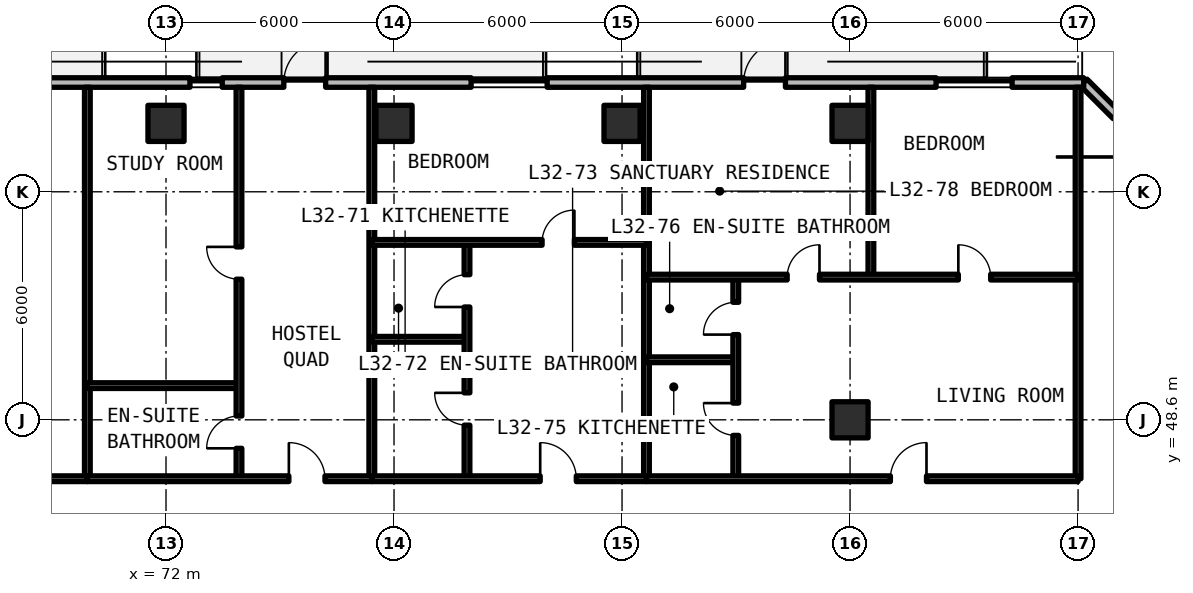
"""IFC4 building model, lengths in metres.
Left out: names, types, materials, properties, quantities, classifications, styles, units other than length and angle.
Written with IfcOpenShell. Run it as: python <this file> out.ifc"""

import sys

from ifc_helpers import new_model, si_unit, direction, frame, frame_2d, origin, origin_2d, place, context, subcontext, project, spatial, rectangle, extrude, element, fill, save


model = new_model("IFC4")
c1 = context("Model", 3, precision=1e-05, world=origin(), true_north=direction((0.0, 1.0)))
c2 = subcontext(c1, "Body", "Model", "MODEL_VIEW")
j1 = project(units=[si_unit("LENGTHUNIT", "METRE"), si_unit("PLANEANGLEUNIT", "RADIAN")], contexts=[c1])
p1 = place(None, origin())
s1 = spatial("IfcSite", under=j1, at=p1, CompositionType="ELEMENT")
p2 = place(p1, origin())
s2 = spatial("IfcBuilding", under=s1, at=p2, CompositionType="ELEMENT")
p3 = place(p2, frame((0.0, 0.0, 115.83)))
s3 = spatial("IfcBuildingStorey", under=s2, at=p3, CompositionType="ELEMENT", Elevation=115.83)
for number, where, z_axis, x_axis in (
    (1, (90.0, 48.6, 0.0), (0.0, 0.0, 1.0), (1.0, 0.0, 0.0)),
    (2, (72.0, 56.4, 0.0), (0.0, 0.0, 1.0), (1.0, 0.0, 0.0)),
    (3, (78.0, 56.4, 0.0), (0.0, 0.0, 1.0), (1.0, 0.0, 0.0)),
    (4, (84.0, 56.4, 0.0), (0.0, 0.0, 1.0), (1.0, 0.0, 0.0)),
    (5, (90.0, 56.4, 0.0), (0.0, 0.0, 1.0), (1.0, 0.0, 0.0)),
):
    element("IfcColumn", number, at=place(p3, frame(where, z_axis=z_axis, x_axis=x_axis)), inside=s3, PredefinedType="COLUMN", context=c2, shape_type="SweptSolid", body=[
        extrude(rectangle(XDim=0.95, YDim=0.95, at=origin_2d()), origin(), (0.0, 0.0, 1.0), 3.63),
    ])
p4 = place(p3, frame((100.275, 53.348, 0.0), z_axis=(0.0, 0.0, 1.0), x_axis=(-0.70708586489, 0.707127696864, 0.0)))
e6 = element("IfcWall", 6, at=p4, inside=s3, PredefinedType="SOLIDWALL", context=c2, shape_type="SweptSolid", body=[
    extrude(rectangle(XDim=5.836, YDim=0.25, at=frame_2d((2.918, 0.0))), origin(), (0.0, 0.0, 1.0), 3.41),
])
p5 = place(p4, frame((1.218, 0.0, 0.78)))
e7 = element("IfcOpeningElement", 7, at=p5, cuts=e6, PredefinedType="OPENING", context=c2, shape_type="SweptSolid", body=[
    extrude(rectangle(XDim=3.4, YDim=1.66, at=frame_2d((1.7, 0.83))), frame((0.0, 0.135, 0.0), z_axis=(0.0, -1.0, 0.0), x_axis=(1.0, 0.0, 0.0)), (0.0, 0.0, 1.0), 0.27),
])
p6 = place(p3, frame((96.148, 57.475, 0.0), z_axis=(0.0, 0.0, 1.0), x_axis=(-1.0, 0.0, 0.0)))
e8 = element("IfcWall", 8, at=p6, inside=s3, PredefinedType="SOLIDWALL", context=c2, shape_type="SweptSolid", body=[
    extrude(rectangle(XDim=44.023, YDim=0.25, at=frame_2d((22.012, 0.0))), origin(), (0.0, 0.0, 1.0), 3.41),
])
p7 = place(p6, frame((32.048, 0.0, 0.0)))
e9 = element("IfcOpeningElement", 9, at=p7, cuts=e8, PredefinedType="OPENING", context=c2, shape_type="SweptSolid", body=[
    extrude(rectangle(XDim=1.1, YDim=2.15, at=frame_2d((0.55, 1.075))), frame((0.0, 0.135, 0.0), z_axis=(0.0, -1.0, 0.0), x_axis=(1.0, 0.0, 0.0)), (0.0, 0.0, 1.0), 0.27),
])
p8 = place(p6, frame((19.948, 0.0, 0.0)))
e10 = element("IfcOpeningElement", 10, at=p8, cuts=e8, PredefinedType="OPENING", context=c2, shape_type="SweptSolid", body=[
    extrude(rectangle(XDim=1.1, YDim=2.15, at=frame_2d((0.55, 1.075))), frame((0.0, 0.135, 0.0), z_axis=(0.0, -1.0, 0.0), x_axis=(1.0, 0.0, 0.0)), (0.0, 0.0, 1.0), 0.27),
])
p9 = place(p6, frame((7.848, 0.0, 0.0)))
e11 = element("IfcOpeningElement", 11, at=p9, cuts=e8, PredefinedType="OPENING", context=c2, shape_type="SweptSolid", body=[
    extrude(rectangle(XDim=1.1, YDim=2.15, at=frame_2d((0.55, 1.075))), frame((0.0, 0.135, 0.0), z_axis=(0.0, -1.0, 0.0), x_axis=(1.0, 0.0, 0.0)), (0.0, 0.0, 1.0), 0.27),
])
p10 = place(p6, frame((38.769, 0.0, 0.78)))
e12 = element("IfcOpeningElement", 12, at=p10, cuts=e8, PredefinedType="OPENING", context=c2, shape_type="SweptSolid", body=[
    extrude(rectangle(XDim=2.0, YDim=1.66, at=frame_2d((1.0, 0.83))), frame((0.0, 0.135, 0.0), z_axis=(0.0, -1.0, 0.0), x_axis=(1.0, 0.0, 0.0)), (0.0, 0.0, 1.0), 0.27),
])
p11 = place(p6, frame((22.668, 0.0, 0.78)))
e13 = element("IfcOpeningElement", 13, at=p11, cuts=e8, PredefinedType="OPENING", context=c2, shape_type="SweptSolid", body=[
    extrude(rectangle(XDim=0.85, YDim=1.65, at=frame_2d((0.425, 0.825))), frame((0.0, 0.135, 0.0), z_axis=(0.0, -1.0, 0.0), x_axis=(1.0, 0.0, 0.0)), (0.0, 0.0, 1.0), 0.27),
])
p12 = place(p6, frame((14.119, 0.0, 0.78)))
e14 = element("IfcOpeningElement", 14, at=p12, cuts=e8, PredefinedType="OPENING", context=c2, shape_type="SweptSolid", body=[
    extrude(rectangle(XDim=2.0, YDim=1.66, at=frame_2d((1.0, 0.83))), frame((0.0, 0.135, 0.0), z_axis=(0.0, -1.0, 0.0), x_axis=(1.0, 0.0, 0.0)), (0.0, 0.0, 1.0), 0.27),
])
p13 = place(p6, frame((1.884, 0.0, 0.78)))
e15 = element("IfcOpeningElement", 15, at=p13, cuts=e8, PredefinedType="OPENING", context=c2, shape_type="SweptSolid", body=[
    extrude(rectangle(XDim=2.0, YDim=1.66, at=frame_2d((1.0, 0.83))), frame((0.0, 0.135, 0.0), z_axis=(0.0, -1.0, 0.0), x_axis=(1.0, 0.0, 0.0)), (0.0, 0.0, 1.0), 0.27),
])
for number, where, z_axis, x_axis in (
    (16, (96.0, 47.05, 0.0), (0.0, 0.0, 1.0), (0.0, 1.0, 0.0)),
    (17, (69.93, 47.05, 0.0), (0.0, 0.0, 1.0), (0.0, 1.0, 0.0)),
):
    element("IfcWall", number, at=place(p3, frame(where, z_axis=z_axis, x_axis=x_axis)), inside=s3, PredefinedType="SOLIDWALL", context=c2, shape_type="SweptSolid", body=[
        extrude(rectangle(XDim=10.3, YDim=0.15, at=frame_2d((5.15, 0.0))), origin(), (0.0, 0.0, 1.0), 2.63),
    ])
p14 = place(p3, frame((60.638, 47.05, 0.0), z_axis=(0.0, 0.0, 1.0), x_axis=(1.0, 0.0, 0.0)))
e18 = element("IfcWall", 18, at=p14, inside=s3, PredefinedType="SOLIDWALL", context=c2, shape_type="SweptSolid", body=[
    extrude(rectangle(XDim=9.292, YDim=0.15, at=frame_2d((4.646, 0.0))), origin(), (0.0, 0.0, 1.0), 2.63),
])
p15 = place(p14, frame((4.096, 0.0, 0.0)))
e19 = element("IfcOpeningElement", 19, at=p15, cuts=e18, PredefinedType="OPENING", context=c2, shape_type="SweptSolid", body=[
    extrude(rectangle(XDim=1.1, YDim=2.15, at=frame_2d((0.55, 1.075))), frame((0.0, 0.085, 0.0), z_axis=(0.0, -1.0, 0.0), x_axis=(1.0, 0.0, 0.0)), (0.0, 0.0, 1.0), 0.17),
])
p16 = place(p3, frame((77.416, 47.05, 0.0), z_axis=(0.0, 0.0, 1.0), x_axis=(0.0, 1.0, 0.0)))
e20 = element("IfcWall", 20, at=p16, inside=s3, PredefinedType="SOLIDWALL", context=c2, shape_type="SweptSolid", body=[
    extrude(rectangle(XDim=10.3, YDim=0.15, at=frame_2d((5.15, 0.0))), origin(), (0.0, 0.0, 1.0), 2.63),
])
p17 = place(p3, frame((69.93, 49.5, 0.0), z_axis=(0.0, 0.0, 1.0), x_axis=(1.0, 0.0, 0.0)))
e21 = element("IfcWall", 21, at=p17, inside=s3, PredefinedType="PARTITIONING", context=c2, shape_type="SweptSolid", body=[
    extrude(rectangle(XDim=3.99, YDim=0.15, at=frame_2d((1.995, 0.0))), origin(), (0.0, 0.0, 1.0), 2.63),
])
p18 = place(p3, frame((73.92, 47.05, 0.0), z_axis=(0.0, 0.0, 1.0), x_axis=(0.0, 1.0, 0.0)))
e22 = element("IfcWall", 22, at=p18, inside=s3, PredefinedType="PARTITIONING", context=c2, shape_type="SweptSolid", body=[
    extrude(rectangle(XDim=10.3, YDim=0.15, at=frame_2d((5.15, 0.0))), origin(), (0.0, 0.0, 1.0), 2.63),
])
p19 = place(p18, frame((0.8, 0.0, 0.0)))
e23 = element("IfcOpeningElement", 23, at=p19, cuts=e22, PredefinedType="OPENING", context=c2, shape_type="SweptSolid", body=[
    extrude(rectangle(XDim=0.85, YDim=2.1, at=frame_2d((0.425, 1.05))), frame((0.0, 0.085, 0.0), z_axis=(0.0, -1.0, 0.0), x_axis=(1.0, 0.0, 0.0)), (0.0, 0.0, 1.0), 0.17),
])
p20 = place(p18, frame((5.25, 0.0, 0.0)))
e24 = element("IfcOpeningElement", 24, at=p20, cuts=e22, PredefinedType="OPENING", context=c2, shape_type="SweptSolid", body=[
    extrude(rectangle(XDim=0.85, YDim=2.1, at=frame_2d((0.425, 1.05))), frame((0.0, 0.085, 0.0), z_axis=(0.0, -1.0, 0.0), x_axis=(1.0, 0.0, 0.0)), (0.0, 0.0, 1.0), 0.17),
])
p21 = place(p3, frame((69.93, 47.05, 0.0), z_axis=(0.0, 0.0, 1.0), x_axis=(1.0, 0.0, 0.0)))
e25 = element("IfcWall", 25, at=p21, inside=s3, PredefinedType="SOLIDWALL", context=c2, shape_type="SweptSolid", body=[
    extrude(rectangle(XDim=7.485, YDim=0.15, at=frame_2d((3.743, 0.0))), origin(), (0.0, 0.0, 1.0), 2.63),
])
p22 = place(p21, frame((5.302, 0.0, 0.0)))
e26 = element("IfcOpeningElement", 26, at=p22, cuts=e25, PredefinedType="OPENING", context=c2, shape_type="SweptSolid", body=[
    extrude(rectangle(XDim=0.95, YDim=2.15, at=frame_2d((0.475, 1.075))), frame((0.0, 0.085, 0.0), z_axis=(0.0, -1.0, 0.0), x_axis=(1.0, 0.0, 0.0)), (0.0, 0.0, 1.0), 0.17),
])
p23 = place(p3, frame((84.643, 47.05, 0.0), z_axis=(0.0, 0.0, 1.0), x_axis=(0.0, 1.0, 0.0)))
e27 = element("IfcWall", 27, at=p23, inside=s3, PredefinedType="SOLIDWALL", context=c2, shape_type="SweptSolid", body=[
    extrude(rectangle(XDim=10.3, YDim=0.15, at=frame_2d((5.15, 0.0))), origin(), (0.0, 0.0, 1.0), 2.63),
])
p24 = place(p3, frame((77.416, 50.719, 0.0), z_axis=(0.0, 0.0, 1.0), x_axis=(1.0, 0.0, 0.0)))
e28 = element("IfcWall", 28, at=p24, inside=s3, PredefinedType="PARTITIONING", context=c2, shape_type="SweptSolid", body=[
    extrude(rectangle(XDim=2.504, YDim=0.15, at=frame_2d((1.252, 0.0))), origin(), (0.0, 0.0, 1.0), 2.63),
])
p25 = place(p3, frame((79.92, 47.05, 0.0), z_axis=(0.0, 0.0, 1.0), x_axis=(0.0, 1.0, 0.0)))
e29 = element("IfcWall", 29, at=p25, inside=s3, PredefinedType="PARTITIONING", context=c2, shape_type="SweptSolid", body=[
    extrude(rectangle(XDim=6.218, YDim=0.15, at=frame_2d((3.109, 0.0))), origin(), (0.0, 0.0, 1.0), 2.63),
])
p26 = place(p25, frame((1.409, 0.0, 0.0)))
e30 = element("IfcOpeningElement", 30, at=p26, cuts=e29, PredefinedType="OPENING", context=c2, shape_type="SweptSolid", body=[
    extrude(rectangle(XDim=0.85, YDim=2.1, at=frame_2d((0.425, 1.05))), frame((0.0, 0.085, 0.0), z_axis=(0.0, -1.0, 0.0), x_axis=(1.0, 0.0, 0.0)), (0.0, 0.0, 1.0), 0.17),
])
p27 = place(p25, frame((4.519, 0.0, 0.0)))
e31 = element("IfcOpeningElement", 31, at=p27, cuts=e29, PredefinedType="OPENING", context=c2, shape_type="SweptSolid", body=[
    extrude(rectangle(XDim=0.85, YDim=2.1, at=frame_2d((0.425, 1.05))), frame((0.0, 0.085, 0.0), z_axis=(0.0, -1.0, 0.0), x_axis=(1.0, 0.0, 0.0)), (0.0, 0.0, 1.0), 0.17),
])
p28 = place(p3, frame((77.416, 53.268, 0.0), z_axis=(0.0, 0.0, 1.0), x_axis=(1.0, 0.0, 0.0)))
e32 = element("IfcWall", 32, at=p28, inside=s3, PredefinedType="PARTITIONING", context=c2, shape_type="SweptSolid", body=[
    extrude(rectangle(XDim=7.227, YDim=0.15, at=frame_2d((3.614, 0.0))), origin(), (0.0, 0.0, 1.0), 2.63),
])
p29 = place(p28, frame((4.481, 0.0, 0.0)))
e33 = element("IfcOpeningElement", 33, at=p29, cuts=e32, PredefinedType="OPENING", context=c2, shape_type="SweptSolid", body=[
    extrude(rectangle(XDim=0.85, YDim=2.1, at=frame_2d((0.425, 1.05))), frame((0.0, 0.085, 0.0), z_axis=(0.0, -1.0, 0.0), x_axis=(1.0, 0.0, 0.0)), (0.0, 0.0, 1.0), 0.17),
])
p30 = place(p3, frame((77.416, 47.05, 0.0), z_axis=(0.0, 0.0, 1.0), x_axis=(1.0, 0.0, 0.0)))
e34 = element("IfcWall", 34, at=p30, inside=s3, PredefinedType="SOLIDWALL", context=c2, shape_type="SweptSolid", body=[
    extrude(rectangle(XDim=7.227, YDim=0.15, at=frame_2d((3.614, 0.0))), origin(), (0.0, 0.0, 1.0), 2.63),
])
p31 = place(p30, frame((4.431, 0.0, 0.0)))
e35 = element("IfcOpeningElement", 35, at=p31, cuts=e34, PredefinedType="OPENING", context=c2, shape_type="SweptSolid", body=[
    extrude(rectangle(XDim=0.95, YDim=2.15, at=frame_2d((0.475, 1.075))), frame((0.0, 0.085, 0.0), z_axis=(0.0, -1.0, 0.0), x_axis=(1.0, 0.0, 0.0)), (0.0, 0.0, 1.0), 0.17),
])
p32 = place(p3, frame((84.643, 50.18, 0.0), z_axis=(0.0, 0.0, 1.0), x_axis=(1.0, 0.0, 0.0)))
e36 = element("IfcWall", 36, at=p32, inside=s3, PredefinedType="PARTITIONING", context=c2, shape_type="SweptSolid", body=[
    extrude(rectangle(XDim=2.35, YDim=0.15, at=frame_2d((1.175, 0.0))), origin(), (0.0, 0.0, 1.0), 2.63),
])
p33 = place(p3, frame((86.993, 47.05, 0.0), z_axis=(0.0, 0.0, 1.0), x_axis=(0.0, 1.0, 0.0)))
e37 = element("IfcWall", 37, at=p33, inside=s3, PredefinedType="PARTITIONING", context=c2, shape_type="SweptSolid", body=[
    extrude(rectangle(XDim=5.305, YDim=0.15, at=frame_2d((2.652, 0.0))), origin(), (0.0, 0.0, 1.0), 2.63),
])
p34 = place(p33, frame((1.14, 0.0, 0.0)))
e38 = element("IfcOpeningElement", 38, at=p34, cuts=e37, PredefinedType="OPENING", context=c2, shape_type="SweptSolid", body=[
    extrude(rectangle(XDim=0.85, YDim=2.1, at=frame_2d((0.425, 1.05))), frame((0.0, 0.085, 0.0), z_axis=(0.0, -1.0, 0.0), x_axis=(1.0, 0.0, 0.0)), (0.0, 0.0, 1.0), 0.17),
])
p35 = place(p33, frame((3.792, 0.0, 0.0)))
e39 = element("IfcOpeningElement", 39, at=p35, cuts=e37, PredefinedType="OPENING", context=c2, shape_type="SweptSolid", body=[
    extrude(rectangle(XDim=0.85, YDim=2.1, at=frame_2d((0.425, 1.05))), frame((0.0, 0.085, 0.0), z_axis=(0.0, -1.0, 0.0), x_axis=(1.0, 0.0, 0.0)), (0.0, 0.0, 1.0), 0.17),
])
p36 = place(p3, frame((90.549, 52.355, 0.0), z_axis=(0.0, 0.0, 1.0), x_axis=(0.0, 1.0, 0.0)))
e40 = element("IfcWall", 40, at=p36, inside=s3, PredefinedType="PARTITIONING", context=c2, shape_type="SweptSolid", body=[
    extrude(rectangle(XDim=4.995, YDim=0.15, at=frame_2d((2.498, 0.0))), origin(), (0.0, 0.0, 1.0), 2.63),
])
p37 = place(p3, frame((84.643, 52.355, 0.0), z_axis=(0.0, 0.0, 1.0), x_axis=(1.0, 0.0, 0.0)))
e41 = element("IfcWall", 41, at=p37, inside=s3, PredefinedType="PARTITIONING", context=c2, shape_type="SweptSolid", body=[
    extrude(rectangle(XDim=11.357, YDim=0.15, at=frame_2d((5.679, 0.0))), origin(), (0.0, 0.0, 1.0), 2.63),
])
p38 = place(p37, frame((3.703, 0.0, 0.0)))
e42 = element("IfcOpeningElement", 42, at=p38, cuts=e41, PredefinedType="OPENING", context=c2, shape_type="SweptSolid", body=[
    extrude(rectangle(XDim=0.85, YDim=2.1, at=frame_2d((0.425, 1.05))), frame((0.0, 0.085, 0.0), z_axis=(0.0, -1.0, 0.0), x_axis=(1.0, 0.0, 0.0)), (0.0, 0.0, 1.0), 0.17),
])
p39 = place(p37, frame((8.207, 0.0, 0.0)))
e43 = element("IfcOpeningElement", 43, at=p39, cuts=e41, PredefinedType="OPENING", context=c2, shape_type="SweptSolid", body=[
    extrude(rectangle(XDim=0.85, YDim=2.1, at=frame_2d((0.425, 1.05))), frame((0.0, 0.085, 0.0), z_axis=(0.0, -1.0, 0.0), x_axis=(1.0, 0.0, 0.0)), (0.0, 0.0, 1.0), 0.17),
])
p40 = place(p3, frame((84.643, 47.05, 0.0), z_axis=(0.0, 0.0, 1.0), x_axis=(1.0, 0.0, 0.0)))
e44 = element("IfcWall", 44, at=p40, inside=s3, PredefinedType="SOLIDWALL", context=c2, shape_type="SweptSolid", body=[
    extrude(rectangle(XDim=11.357, YDim=0.15, at=frame_2d((5.679, 0.0))), origin(), (0.0, 0.0, 1.0), 2.63),
])
p41 = place(p40, frame((6.419, 0.0, 0.0)))
e45 = element("IfcOpeningElement", 45, at=p41, cuts=e44, PredefinedType="OPENING", context=c2, shape_type="SweptSolid", body=[
    extrude(rectangle(XDim=0.95, YDim=2.15, at=frame_2d((0.475, 1.075))), frame((0.0, 0.085, 0.0), z_axis=(0.0, -1.0, 0.0), x_axis=(1.0, 0.0, 0.0)), (0.0, 0.0, 1.0), 0.17),
])
p42 = place(p8, frame((1.1, 0.0, 0.0), z_axis=(0.0, 0.0, 1.0), x_axis=(-1.0, 0.0, 0.0)))
e46 = element("IfcDoor", 46, at=p42, inside=s3, OperationType="SINGLE_SWING_RIGHT", PredefinedType="DOOR", context=c2, shape_type="SweptSolid", body=[
    extrude(rectangle(XDim=1.1, YDim=2.15, at=frame_2d((0.55, 1.075))), frame((0.0, 0.025, 0.0), z_axis=(0.0, -1.0, 0.0), x_axis=(1.0, 0.0, 0.0)), (0.0, 0.0, 1.0), 0.05),
])
fill(e10, e46)
p43 = place(p9, frame((1.1, 0.0, 0.0), z_axis=(0.0, 0.0, 1.0), x_axis=(-1.0, 0.0, 0.0)))
e47 = element("IfcDoor", 47, at=p43, inside=s3, OperationType="SINGLE_SWING_LEFT", PredefinedType="DOOR", context=c2, shape_type="SweptSolid", body=[
    extrude(rectangle(XDim=1.1, YDim=2.15, at=frame_2d((0.55, 1.075))), frame((0.0, 0.025, 0.0), z_axis=(0.0, -1.0, 0.0), x_axis=(1.0, 0.0, 0.0)), (0.0, 0.0, 1.0), 0.05),
])
fill(e11, e47)
p44 = place(p11, origin())
e48 = element("IfcWindow", 48, at=p44, inside=s3, PartitioningType="SINGLE_PANEL", PredefinedType="WINDOW", context=c2, shape_type="SweptSolid", body=[
    extrude(rectangle(XDim=0.85, YDim=1.65, at=frame_2d((0.425, 0.825))), frame((0.0, 0.03, 0.0), z_axis=(0.0, -1.0, 0.0), x_axis=(1.0, 0.0, 0.0)), (0.0, 0.0, 1.0), 0.06),
])
fill(e13, e48)
p45 = place(p12, origin())
e49 = element("IfcWindow", 49, at=p45, inside=s3, PartitioningType="SINGLE_PANEL", PredefinedType="WINDOW", context=c2, shape_type="SweptSolid", body=[
    extrude(rectangle(XDim=2.0, YDim=1.66, at=frame_2d((1.0, 0.83))), frame((0.0, 0.03, 0.0), z_axis=(0.0, -1.0, 0.0), x_axis=(1.0, 0.0, 0.0)), (0.0, 0.0, 1.0), 0.06),
])
fill(e14, e49)
p46 = place(p13, origin())
e50 = element("IfcWindow", 50, at=p46, inside=s3, PartitioningType="SINGLE_PANEL", PredefinedType="WINDOW", context=c2, shape_type="SweptSolid", body=[
    extrude(rectangle(XDim=2.0, YDim=1.66, at=frame_2d((1.0, 0.83))), frame((0.0, 0.03, 0.0), z_axis=(0.0, -1.0, 0.0), x_axis=(1.0, 0.0, 0.0)), (0.0, 0.0, 1.0), 0.06),
])
fill(e15, e50)
p47 = place(p19, origin())
e51 = element("IfcDoor", 51, at=p47, inside=s3, OperationType="SINGLE_SWING_LEFT", PredefinedType="DOOR", context=c2, shape_type="SweptSolid", body=[
    extrude(rectangle(XDim=0.85, YDim=2.1, at=frame_2d((0.425, 1.05))), frame((0.0, 0.025, 0.0), z_axis=(0.0, -1.0, 0.0), x_axis=(1.0, 0.0, 0.0)), (0.0, 0.0, 1.0), 0.05),
])
fill(e23, e51)
p48 = place(p20, origin())
e52 = element("IfcDoor", 52, at=p48, inside=s3, OperationType="SINGLE_SWING_RIGHT", PredefinedType="DOOR", context=c2, shape_type="SweptSolid", body=[
    extrude(rectangle(XDim=0.85, YDim=2.1, at=frame_2d((0.425, 1.05))), frame((0.0, 0.025, 0.0), z_axis=(0.0, -1.0, 0.0), x_axis=(1.0, 0.0, 0.0)), (0.0, 0.0, 1.0), 0.05),
])
fill(e24, e52)
p49 = place(p22, origin())
e53 = element("IfcDoor", 53, at=p49, inside=s3, OperationType="SINGLE_SWING_LEFT", PredefinedType="DOOR", context=c2, shape_type="SweptSolid", body=[
    extrude(rectangle(XDim=0.95, YDim=2.15, at=frame_2d((0.475, 1.075))), frame((0.0, 0.025, 0.0), z_axis=(0.0, -1.0, 0.0), x_axis=(1.0, 0.0, 0.0)), (0.0, 0.0, 1.0), 0.05),
])
fill(e26, e53)
p50 = place(p26, origin())
e54 = element("IfcDoor", 54, at=p50, inside=s3, OperationType="SINGLE_SWING_RIGHT", PredefinedType="DOOR", context=c2, shape_type="SweptSolid", body=[
    extrude(rectangle(XDim=0.85, YDim=2.1, at=frame_2d((0.425, 1.05))), frame((0.0, 0.025, 0.0), z_axis=(0.0, -1.0, 0.0), x_axis=(1.0, 0.0, 0.0)), (0.0, 0.0, 1.0), 0.05),
])
fill(e30, e54)
p51 = place(p27, origin())
e55 = element("IfcDoor", 55, at=p51, inside=s3, OperationType="SINGLE_SWING_LEFT", PredefinedType="DOOR", context=c2, shape_type="SweptSolid", body=[
    extrude(rectangle(XDim=0.85, YDim=2.1, at=frame_2d((0.425, 1.05))), frame((0.0, 0.025, 0.0), z_axis=(0.0, -1.0, 0.0), x_axis=(1.0, 0.0, 0.0)), (0.0, 0.0, 1.0), 0.05),
])
fill(e31, e55)
p52 = place(p29, origin())
e56 = element("IfcDoor", 56, at=p52, inside=s3, OperationType="SINGLE_SWING_RIGHT", PredefinedType="DOOR", context=c2, shape_type="SweptSolid", body=[
    extrude(rectangle(XDim=0.85, YDim=2.1, at=frame_2d((0.425, 1.05))), frame((0.0, 0.025, 0.0), z_axis=(0.0, -1.0, 0.0), x_axis=(1.0, 0.0, 0.0)), (0.0, 0.0, 1.0), 0.05),
])
fill(e33, e56)
p53 = place(p31, origin())
e57 = element("IfcDoor", 57, at=p53, inside=s3, OperationType="SINGLE_SWING_LEFT", PredefinedType="DOOR", context=c2, shape_type="SweptSolid", body=[
    extrude(rectangle(XDim=0.95, YDim=2.15, at=frame_2d((0.475, 1.075))), frame((0.0, 0.025, 0.0), z_axis=(0.0, -1.0, 0.0), x_axis=(1.0, 0.0, 0.0)), (0.0, 0.0, 1.0), 0.05),
])
fill(e35, e57)
p54 = place(p34, origin())
e58 = element("IfcDoor", 58, at=p54, inside=s3, OperationType="SINGLE_SWING_RIGHT", PredefinedType="DOOR", context=c2, shape_type="SweptSolid", body=[
    extrude(rectangle(XDim=0.85, YDim=2.1, at=frame_2d((0.425, 1.05))), frame((0.0, 0.025, 0.0), z_axis=(0.0, -1.0, 0.0), x_axis=(1.0, 0.0, 0.0)), (0.0, 0.0, 1.0), 0.05),
])
fill(e38, e58)
p55 = place(p35, origin())
e59 = element("IfcDoor", 59, at=p55, inside=s3, OperationType="SINGLE_SWING_LEFT", PredefinedType="DOOR", context=c2, shape_type="SweptSolid", body=[
    extrude(rectangle(XDim=0.85, YDim=2.1, at=frame_2d((0.425, 1.05))), frame((0.0, 0.025, 0.0), z_axis=(0.0, -1.0, 0.0), x_axis=(1.0, 0.0, 0.0)), (0.0, 0.0, 1.0), 0.05),
])
fill(e39, e59)
p56 = place(p38, origin())
e60 = element("IfcDoor", 60, at=p56, inside=s3, OperationType="SINGLE_SWING_RIGHT", PredefinedType="DOOR", context=c2, shape_type="SweptSolid", body=[
    extrude(rectangle(XDim=0.85, YDim=2.1, at=frame_2d((0.425, 1.05))), frame((0.0, 0.025, 0.0), z_axis=(0.0, -1.0, 0.0), x_axis=(1.0, 0.0, 0.0)), (0.0, 0.0, 1.0), 0.05),
])
fill(e42, e60)
p57 = place(p39, origin())
e61 = element("IfcDoor", 61, at=p57, inside=s3, OperationType="SINGLE_SWING_LEFT", PredefinedType="DOOR", context=c2, shape_type="SweptSolid", body=[
    extrude(rectangle(XDim=0.85, YDim=2.1, at=frame_2d((0.425, 1.05))), frame((0.0, 0.025, 0.0), z_axis=(0.0, -1.0, 0.0), x_axis=(1.0, 0.0, 0.0)), (0.0, 0.0, 1.0), 0.05),
])
fill(e43, e61)
p58 = place(p41, origin())
e62 = element("IfcDoor", 62, at=p58, inside=s3, OperationType="SINGLE_SWING_RIGHT", PredefinedType="DOOR", context=c2, shape_type="SweptSolid", body=[
    extrude(rectangle(XDim=0.95, YDim=2.15, at=frame_2d((0.475, 1.075))), frame((0.0, 0.025, 0.0), z_axis=(0.0, -1.0, 0.0), x_axis=(1.0, 0.0, 0.0)), (0.0, 0.0, 1.0), 0.05),
])
fill(e45, e62)
save(model, sys.argv[1])
